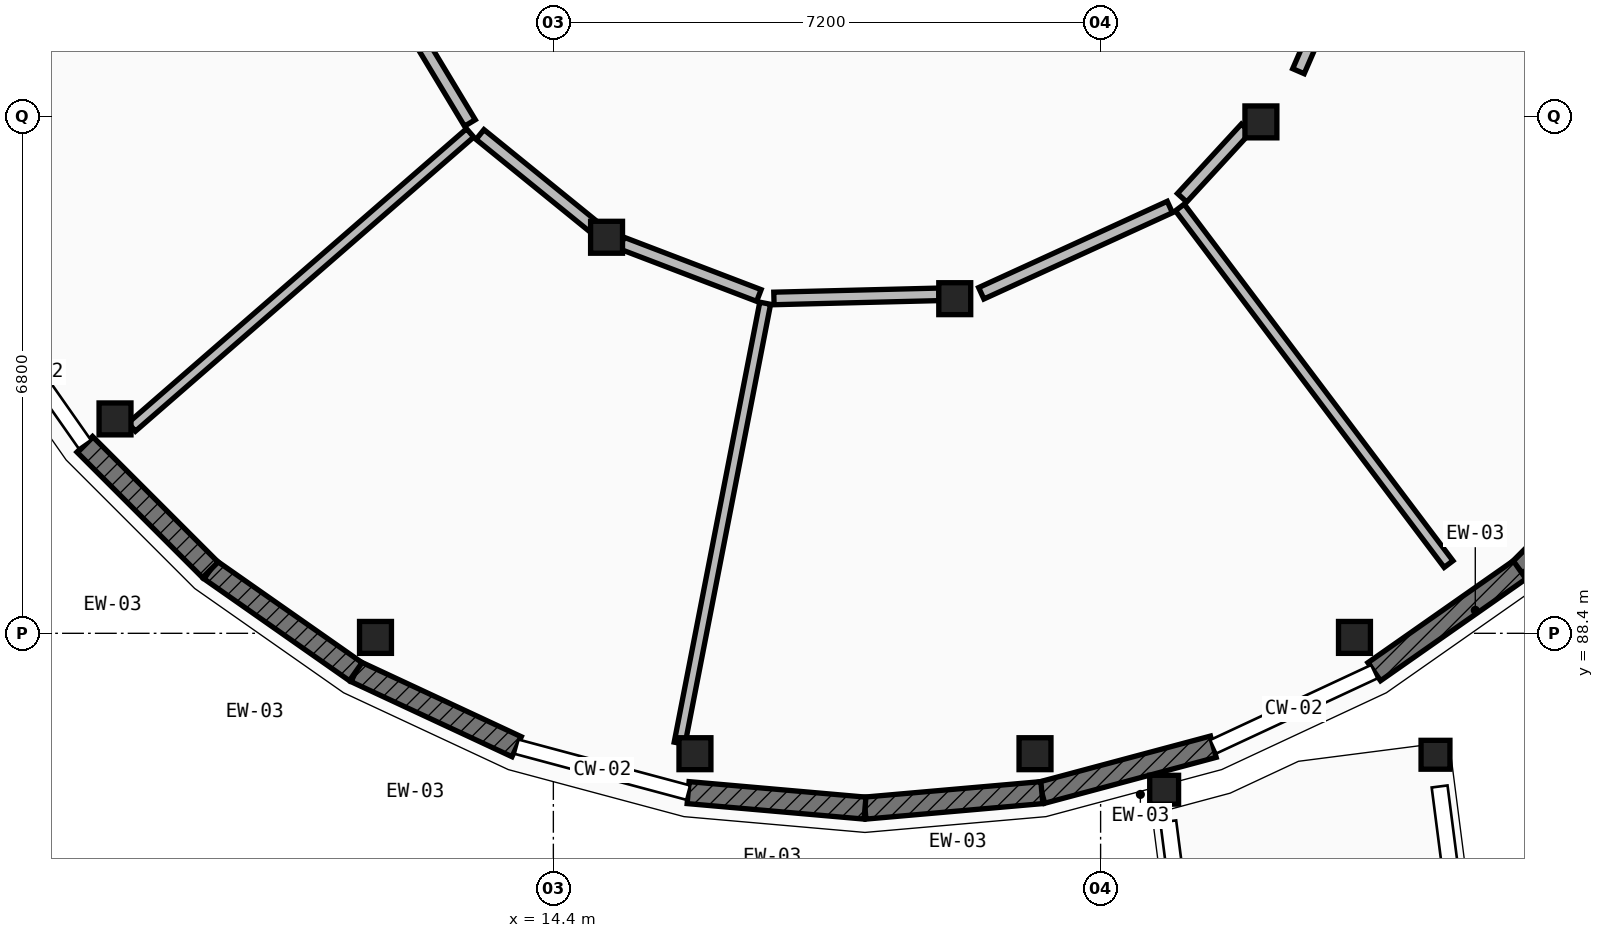
"""IFC4 building model, lengths in metres.
Left out: names, types, materials, properties, quantities, classifications, styles, units other than length and angle.
Written with IfcOpenShell. Run it as: python <this file> out.ifc"""

import sys

from ifc_helpers import new_model, si_unit, direction, frame, frame_2d, origin, origin_2d, place, context, subcontext, project, spatial, rectangle, circle, extrude, element, fill, save


model = new_model("IFC4")
c1 = context("Model", 3, precision=1e-05, world=origin(), true_north=direction((0.0, 1.0)))
c2 = subcontext(c1, "Body", "Model", "MODEL_VIEW")
j1 = project(units=[si_unit("LENGTHUNIT", "METRE"), si_unit("PLANEANGLEUNIT", "RADIAN")], contexts=[c1])
p1 = place(None, origin())
s1 = spatial("IfcSite", under=j1, at=p1, CompositionType="ELEMENT")
p2 = place(p1, origin())
s2 = spatial("IfcBuilding", under=s1, at=p2, CompositionType="ELEMENT")
p3 = place(p2, frame((0.0, 0.0, 4.55)))
s3 = spatial("IfcBuildingStorey", under=s2, at=p3, CompositionType="ELEMENT", Elevation=4.55)
for number, where, z_axis, x_axis in (
    (1, (8.633, 91.221, 0.0), (0.0, 0.0, 1.0), (1.0, 0.0, 0.0)),
    (2, (12.06, 88.346, 0.0), (0.0, 0.0, 1.0), (1.0, 0.0, 0.0)),
    (3, (16.263, 86.816, 0.0), (0.0, 0.0, 1.0), (1.0, 0.0, 0.0)),
    (4, (20.737, 86.816, 0.0), (0.0, 0.0, 1.0), (1.0, 0.0, 0.0)),
    (5, (24.94, 88.346, 0.0), (0.0, 0.0, 1.0), (1.0, 0.0, 0.0)),
    (6, (15.1, 93.611, 0.0), (0.0, 0.0, 1.0), (1.0, 0.0, 0.0)),
    (7, (19.681, 92.803, 0.0), (0.0, 0.0, 1.0), (1.0, 0.0, 0.0)),
    (8, (23.709, 95.129, 0.0), (0.0, 0.0, 1.0), (1.0, 0.0, 0.0)),
):
    element("IfcColumn", number, at=place(p3, frame(where, z_axis=z_axis, x_axis=x_axis)), inside=s3, PredefinedType="COLUMN", context=c2, shape_type="SweptSolid", body=[
        extrude(rectangle(XDim=0.42, YDim=0.42, at=origin_2d()), origin(), (0.0, 0.0, 1.0), 4.2),
    ])
for number, where, z_axis, x_axis in (
    (9, (22.436, 86.342, 0.0), (0.0, 0.0, 1.0), (1.0, 0.0, 0.0)),
    (10, (26.006, 86.802, 0.0), (0.0, 0.0, 1.0), (1.0, 0.0, 0.0)),
):
    element("IfcColumn", number, at=place(p3, frame(where, z_axis=z_axis, x_axis=x_axis)), inside=s3, PredefinedType="PILASTER", context=c2, shape_type="SweptSolid", body=[
        extrude(circle(Radius=0.19, at=origin_2d()), origin(), (0.0, 0.0, 1.0), 4.2),
    ])
p4 = place(p3, frame((28.765, 90.887, 0.0), z_axis=(0.0, 0.0, 1.0), x_axis=(-0.707106781187, -0.707106781187, 0.0)))
e11 = element("IfcWall", 11, at=p4, inside=s3, PredefinedType="ELEMENTEDWALL", context=c2, shape_type="SweptSolid", body=[
    extrude(rectangle(XDim=2.336, YDim=0.29, at=frame_2d((1.168, 0.0))), origin(), (0.0, 0.0, 1.0), 3.309),
])
p5 = place(p4, frame((0.568, 0.0, 0.85)))
e12 = element("IfcOpeningElement", 12, at=p5, cuts=e11, PredefinedType="OPENING", context=c2, shape_type="SweptSolid", body=[
    extrude(rectangle(XDim=1.2, YDim=2.25, at=frame_2d((0.6, 1.125))), frame((0.0, 0.155, 0.0), z_axis=(0.0, -1.0, 0.0), x_axis=(1.0, 0.0, 0.0)), (0.0, 0.0, 1.0), 0.31),
])
p6 = place(p3, frame((27.113, 89.235, 0.0), z_axis=(0.0, 0.0, 1.0), x_axis=(-0.819045278347, -0.573728883722, 0.0)))
e13 = element("IfcWall", 13, at=p6, inside=s3, PredefinedType="ELEMENTEDWALL", context=c2, shape_type="SweptSolid", body=[
    extrude(rectangle(XDim=2.336, YDim=0.29, at=frame_2d((1.168, 0.0))), origin(), (0.0, 0.0, 1.0), 3.309),
])
p7 = place(p6, frame((0.558, 0.0, 0.85)))
e14 = element("IfcOpeningElement", 14, at=p7, cuts=e13, PredefinedType="OPENING", context=c2, shape_type="SweptSolid", body=[
    extrude(rectangle(XDim=1.22, YDim=1.5, at=frame_2d((0.61, 0.75))), frame((0.0, 0.155, 0.0), z_axis=(0.0, -1.0, 0.0), x_axis=(1.0, 0.0, 0.0)), (0.0, 0.0, 1.0), 0.31),
])
p8 = place(p3, frame((23.083, 86.908, 0.0), z_axis=(0.0, 0.0, 1.0), x_axis=(-0.965981166673, -0.258612423585, 0.0)))
e15 = element("IfcWall", 15, at=p8, inside=s3, PredefinedType="ELEMENTEDWALL", context=c2, shape_type="SweptSolid", body=[
    extrude(rectangle(XDim=2.335, YDim=0.29, at=frame_2d((1.168, 0.0))), origin(), (0.0, 0.0, 1.0), 3.309),
])
p9 = place(p3, frame((20.827, 86.304, 0.0), z_axis=(0.0, 0.0, 1.0), x_axis=(-0.996184295282, -0.087274565792, 0.0)))
e16 = element("IfcWall", 16, at=p9, inside=s3, PredefinedType="ELEMENTEDWALL", context=c2, shape_type="SweptSolid", body=[
    extrude(rectangle(XDim=2.336, YDim=0.29, at=frame_2d((1.168, 0.0))), origin(), (0.0, 0.0, 1.0), 3.309),
])
p10 = place(p9, frame((0.558, 0.0, 0.85)))
e17 = element("IfcOpeningElement", 17, at=p10, cuts=e16, PredefinedType="OPENING", context=c2, shape_type="SweptSolid", body=[
    extrude(rectangle(XDim=1.22, YDim=1.8, at=frame_2d((0.61, 0.9))), frame((0.0, 0.155, 0.0), z_axis=(0.0, -1.0, 0.0), x_axis=(1.0, 0.0, 0.0)), (0.0, 0.0, 1.0), 0.31),
])
p11 = place(p3, frame((18.5, 86.1, 0.0), z_axis=(0.0, 0.0, 1.0), x_axis=(-0.996184295282, 0.087274565792, 0.0)))
e18 = element("IfcWall", 18, at=p11, inside=s3, PredefinedType="ELEMENTEDWALL", context=c2, shape_type="SweptSolid", body=[
    extrude(rectangle(XDim=2.336, YDim=0.29, at=frame_2d((1.168, 0.0))), origin(), (0.0, 0.0, 1.0), 3.309),
])
p12 = place(p11, frame((0.543, 0.0, 0.85)))
e19 = element("IfcOpeningElement", 19, at=p12, cuts=e18, PredefinedType="OPENING", context=c2, shape_type="SweptSolid", body=[
    extrude(rectangle(XDim=1.25, YDim=1.5, at=frame_2d((0.625, 0.75))), frame((0.0, 0.155, 0.0), z_axis=(0.0, -1.0, 0.0), x_axis=(1.0, 0.0, 0.0)), (0.0, 0.0, 1.0), 0.31),
])
p13 = place(p3, frame((13.917, 86.908, 0.0), z_axis=(0.0, 0.0, 1.0), x_axis=(-0.906321946979, 0.422587894318, 0.0)))
e20 = element("IfcWall", 20, at=p13, inside=s3, PredefinedType="ELEMENTEDWALL", context=c2, shape_type="SweptSolid", body=[
    extrude(rectangle(XDim=2.336, YDim=0.29, at=frame_2d((1.168, 0.0))), origin(), (0.0, 0.0, 1.0), 3.309),
])
p14 = place(p13, frame((0.543, 0.0, 0.85)))
e21 = element("IfcOpeningElement", 21, at=p14, cuts=e20, PredefinedType="OPENING", context=c2, shape_type="SweptSolid", body=[
    extrude(rectangle(XDim=1.25, YDim=1.8, at=frame_2d((0.625, 0.9))), frame((0.0, 0.155, 0.0), z_axis=(0.0, -1.0, 0.0), x_axis=(1.0, 0.0, 0.0)), (0.0, 0.0, 1.0), 0.31),
])
p15 = place(p3, frame((11.8, 87.895, 0.0), z_axis=(0.0, 0.0, 1.0), x_axis=(-0.819045278347, 0.573728883722, 0.0)))
e22 = element("IfcWall", 22, at=p15, inside=s3, PredefinedType="ELEMENTEDWALL", context=c2, shape_type="SweptSolid", body=[
    extrude(rectangle(XDim=2.336, YDim=0.29, at=frame_2d((1.168, 0.0))), origin(), (0.0, 0.0, 1.0), 3.309),
])
p16 = place(p15, frame((0.543, 0.0, 0.85)))
e23 = element("IfcOpeningElement", 23, at=p16, cuts=e22, PredefinedType="OPENING", context=c2, shape_type="SweptSolid", body=[
    extrude(rectangle(XDim=1.25, YDim=2.1, at=frame_2d((0.625, 1.05))), frame((0.0, 0.155, 0.0), z_axis=(0.0, -1.0, 0.0), x_axis=(1.0, 0.0, 0.0)), (0.0, 0.0, 1.0), 0.31),
])
p17 = place(p3, frame((9.887, 89.235, 0.0), z_axis=(0.0, 0.0, 1.0), x_axis=(-0.707106781187, 0.707106781187, 0.0)))
e24 = element("IfcWall", 24, at=p17, inside=s3, PredefinedType="ELEMENTEDWALL", context=c2, shape_type="SweptSolid", body=[
    extrude(rectangle(XDim=2.336, YDim=0.29, at=frame_2d((1.168, 0.0))), origin(), (0.0, 0.0, 1.0), 3.309),
])
p18 = place(p17, frame((0.528, 0.0, 0.85)))
e25 = element("IfcOpeningElement", 25, at=p18, cuts=e24, PredefinedType="OPENING", context=c2, shape_type="SweptSolid", body=[
    extrude(rectangle(XDim=1.28, YDim=1.65, at=frame_2d((0.64, 0.825))), frame((0.0, 0.155, 0.0), z_axis=(0.0, -1.0, 0.0), x_axis=(1.0, 0.0, 0.0)), (0.0, 0.0, 1.0), 0.31),
])
p19 = place(p3, frame((13.305, 94.984, 0.0), z_axis=(0.0, 0.0, 1.0), x_axis=(-0.754647404393, -0.656130547256, 0.0)))
e26 = element("IfcWall", 26, at=p19, inside=s3, PredefinedType="PARTITIONING", context=c2, shape_type="SweptSolid", body=[
    extrude(rectangle(XDim=5.898, YDim=0.145, at=frame_2d((2.949, 0.0))), origin(), (0.0, 0.0, 1.0), 3.284),
])
p20 = place(p3, frame((17.187, 92.743, 0.0), z_axis=(0.0, 0.0, 1.0), x_axis=(-0.190930602481, -0.981603537604, 0.0)))
e27 = element("IfcWall", 27, at=p20, inside=s3, PredefinedType="PARTITIONING", context=c2, shape_type="SweptSolid", body=[
    extrude(rectangle(XDim=5.897, YDim=0.145, at=frame_2d((2.949, 0.0))), origin(), (0.0, 0.0, 1.0), 3.284),
])
p21 = place(p3, frame((22.642, 94.003, 0.0), z_axis=(0.0, 0.0, 1.0), x_axis=(0.601846782462, -0.798611576701, 0.0)))
e28 = element("IfcWall", 28, at=p21, inside=s3, PredefinedType="PARTITIONING", context=c2, shape_type="SweptSolid", body=[
    extrude(rectangle(XDim=5.875, YDim=0.145, at=frame_2d((2.938, 0.0))), origin(), (0.0, 0.0, 1.0), 3.284),
])
p22 = place(p3, frame((12.45, 96.53, 0.0), z_axis=(0.0, 0.0, 1.0), x_axis=(0.515842762515, -0.856683281243, 0.0)))
e29 = element("IfcWall", 29, at=p22, inside=s3, PredefinedType="PARTITIONING", context=c2, shape_type="SweptSolid", body=[
    extrude(rectangle(XDim=1.652, YDim=0.165, at=frame_2d((0.826, 0.0))), origin(), (0.0, 0.0, 1.0), 3.284),
])
p23 = place(p22, frame((0.321, 0.0, 0.0)))
e30 = element("IfcOpeningElement", 30, at=p23, cuts=e29, PredefinedType="OPENING", context=c2, shape_type="SweptSolid", body=[
    extrude(rectangle(XDim=1.01, YDim=2.15, at=frame_2d((0.505, 1.075))), frame((0.0, 0.093, 0.0), z_axis=(0.0, -1.0, 0.0), x_axis=(1.0, 0.0, 0.0)), (0.0, 0.0, 1.0), 0.185),
])
p24 = place(p3, frame((13.435, 94.963, 0.0), z_axis=(0.0, 0.0, 1.0), x_axis=(0.776454505021, -0.63017331079, 0.0)))
e31 = element("IfcWall", 31, at=p24, inside=s3, PredefinedType="PARTITIONING", context=c2, shape_type="SweptSolid", body=[
    extrude(rectangle(XDim=1.929, YDim=0.165, at=frame_2d((0.965, 0.0))), origin(), (0.0, 0.0, 1.0), 3.284),
])
p25 = place(p24, frame((0.45, 0.0, 0.0)))
e32 = element("IfcOpeningElement", 32, at=p25, cuts=e31, PredefinedType="OPENING", context=c2, shape_type="SweptSolid", body=[
    extrude(rectangle(XDim=1.03, YDim=2.18, at=frame_2d((0.515, 1.09))), frame((0.0, 0.093, 0.0), z_axis=(0.0, -1.0, 0.0), x_axis=(1.0, 0.0, 0.0)), (0.0, 0.0, 1.0), 0.185),
])
p26 = place(p3, frame((15.301, 93.534, 0.0), z_axis=(0.0, 0.0, 1.0), x_axis=(0.934122555003, -0.356952450944, 0.0)))
e33 = element("IfcWall", 33, at=p26, inside=s3, PredefinedType="PARTITIONING", context=c2, shape_type="SweptSolid", body=[
    extrude(rectangle(XDim=1.93, YDim=0.165, at=frame_2d((0.965, 0.0))), origin(), (0.0, 0.0, 1.0), 3.284),
])
p27 = place(p3, frame((17.302, 92.806, 0.0), z_axis=(0.0, 0.0, 1.0), x_axis=(0.999688838374, 0.024944466912, 0.0)))
e34 = element("IfcWall", 34, at=p27, inside=s3, PredefinedType="PARTITIONING", context=c2, shape_type="SweptSolid", body=[
    extrude(rectangle(XDim=2.173, YDim=0.165, at=frame_2d((1.086, 0.0))), origin(), (0.0, 0.0, 1.0), 3.284),
])
p28 = place(p27, frame((0.552, 0.0, 0.0)))
e35 = element("IfcOpeningElement", 35, at=p28, cuts=e34, PredefinedType="OPENING", context=c2, shape_type="SweptSolid", body=[
    extrude(rectangle(XDim=1.07, YDim=2.2, at=frame_2d((0.535, 1.1))), frame((0.0, 0.093, 0.0), z_axis=(0.0, -1.0, 0.0), x_axis=(1.0, 0.0, 0.0)), (0.0, 0.0, 1.0), 0.185),
])
p29 = place(p3, frame((20.03, 92.874, 0.0), z_axis=(0.0, 0.0, 1.0), x_axis=(0.909355526696, 0.416019862587, 0.0)))
e36 = element("IfcWall", 36, at=p29, inside=s3, PredefinedType="PARTITIONING", context=c2, shape_type="SweptSolid", body=[
    extrude(rectangle(XDim=2.728, YDim=0.165, at=frame_2d((1.364, 0.0))), origin(), (0.0, 0.0, 1.0), 3.284),
])
p30 = place(p3, frame((22.672, 94.131, 0.0), z_axis=(0.0, 0.0, 1.0), x_axis=(0.677069322474, 0.735919243236, 0.0)))
e37 = element("IfcWall", 37, at=p30, inside=s3, PredefinedType="PARTITIONING", context=c2, shape_type="SweptSolid", body=[
    extrude(rectangle(XDim=1.24, YDim=0.165, at=frame_2d((0.62, 0.0))), origin(), (0.0, 0.0, 1.0), 3.284),
])
p31 = place(p3, frame((24.203, 95.796, 0.0), z_axis=(0.0, 0.0, 1.0), x_axis=(0.397419678039, 0.917636964985, 0.0)))
e38 = element("IfcWall", 38, at=p31, inside=s3, PredefinedType="PARTITIONING", context=c2, shape_type="SweptSolid", body=[
    extrude(rectangle(XDim=2.262, YDim=0.165, at=frame_2d((1.131, 0.0))), origin(), (0.0, 0.0, 1.0), 3.284),
])
p32 = place(p31, frame((0.586, 0.0, 0.0)))
e39 = element("IfcOpeningElement", 39, at=p32, cuts=e38, PredefinedType="OPENING", context=c2, shape_type="SweptSolid", body=[
    extrude(rectangle(XDim=1.09, YDim=2.22, at=frame_2d((0.545, 1.11))), frame((0.0, 0.093, 0.0), z_axis=(0.0, -1.0, 0.0), x_axis=(1.0, 0.0, 0.0)), (0.0, 0.0, 1.0), 0.185),
])
p33 = place(p7, origin())
e40 = element("IfcWindow", 40, at=p33, inside=s3, PartitioningType="SINGLE_PANEL", PredefinedType="WINDOW", context=c2, shape_type="SweptSolid", body=[
    extrude(rectangle(XDim=1.22, YDim=1.5, at=frame_2d((0.61, 0.75))), frame((0.0, 0.03, 0.0), z_axis=(0.0, -1.0, 0.0), x_axis=(1.0, 0.0, 0.0)), (0.0, 0.0, 1.0), 0.06),
])
fill(e14, e40)
p34 = place(p10, origin())
e41 = element("IfcWindow", 41, at=p34, inside=s3, PartitioningType="SINGLE_PANEL", PredefinedType="WINDOW", context=c2, shape_type="SweptSolid", body=[
    extrude(rectangle(XDim=1.22, YDim=1.8, at=frame_2d((0.61, 0.9))), frame((0.0, 0.03, 0.0), z_axis=(0.0, -1.0, 0.0), x_axis=(1.0, 0.0, 0.0)), (0.0, 0.0, 1.0), 0.06),
])
fill(e17, e41)
p35 = place(p12, origin())
e42 = element("IfcWindow", 42, at=p35, inside=s3, PartitioningType="SINGLE_PANEL", PredefinedType="WINDOW", context=c2, shape_type="SweptSolid", body=[
    extrude(rectangle(XDim=1.25, YDim=1.5, at=frame_2d((0.625, 0.75))), frame((0.0, 0.03, 0.0), z_axis=(0.0, -1.0, 0.0), x_axis=(1.0, 0.0, 0.0)), (0.0, 0.0, 1.0), 0.06),
])
fill(e19, e42)
p36 = place(p14, origin())
e43 = element("IfcWindow", 43, at=p36, inside=s3, PartitioningType="SINGLE_PANEL", PredefinedType="WINDOW", context=c2, shape_type="SweptSolid", body=[
    extrude(rectangle(XDim=1.25, YDim=1.8, at=frame_2d((0.625, 0.9))), frame((0.0, 0.03, 0.0), z_axis=(0.0, -1.0, 0.0), x_axis=(1.0, 0.0, 0.0)), (0.0, 0.0, 1.0), 0.06),
])
fill(e21, e43)
p37 = place(p16, origin())
e44 = element("IfcWindow", 44, at=p37, inside=s3, PartitioningType="SINGLE_PANEL", PredefinedType="WINDOW", context=c2, shape_type="SweptSolid", body=[
    extrude(rectangle(XDim=1.25, YDim=2.1, at=frame_2d((0.625, 1.05))), frame((0.0, 0.03, 0.0), z_axis=(0.0, -1.0, 0.0), x_axis=(1.0, 0.0, 0.0)), (0.0, 0.0, 1.0), 0.06),
])
fill(e23, e44)
p38 = place(p18, origin())
e45 = element("IfcWindow", 45, at=p38, inside=s3, PartitioningType="SINGLE_PANEL", PredefinedType="WINDOW", context=c2, shape_type="SweptSolid", body=[
    extrude(rectangle(XDim=1.28, YDim=1.65, at=frame_2d((0.64, 0.825))), frame((0.0, 0.03, 0.0), z_axis=(0.0, -1.0, 0.0), x_axis=(1.0, 0.0, 0.0)), (0.0, 0.0, 1.0), 0.06),
])
fill(e25, e45)
p39 = place(p23, origin())
e46 = element("IfcDoor", 46, at=p39, inside=s3, OperationType="SINGLE_SWING_LEFT", PredefinedType="DOOR", context=c2, shape_type="SweptSolid", body=[
    extrude(rectangle(XDim=1.01, YDim=2.15, at=frame_2d((0.505, 1.075))), frame((0.0, 0.025, 0.0), z_axis=(0.0, -1.0, 0.0), x_axis=(1.0, 0.0, 0.0)), (0.0, 0.0, 1.0), 0.05),
])
fill(e30, e46)
p40 = place(p25, origin())
e47 = element("IfcDoor", 47, at=p40, inside=s3, OperationType="SINGLE_SWING_RIGHT", PredefinedType="DOOR", context=c2, shape_type="SweptSolid", body=[
    extrude(rectangle(XDim=1.03, YDim=2.18, at=frame_2d((0.515, 1.09))), frame((0.0, 0.025, 0.0), z_axis=(0.0, -1.0, 0.0), x_axis=(1.0, 0.0, 0.0)), (0.0, 0.0, 1.0), 0.05),
])
fill(e32, e47)
p41 = place(p28, origin())
e48 = element("IfcDoor", 48, at=p41, inside=s3, OperationType="SINGLE_SWING_LEFT", PredefinedType="DOOR", context=c2, shape_type="SweptSolid", body=[
    extrude(rectangle(XDim=1.07, YDim=2.2, at=frame_2d((0.535, 1.1))), frame((0.0, 0.025, 0.0), z_axis=(0.0, -1.0, 0.0), x_axis=(1.0, 0.0, 0.0)), (0.0, 0.0, 1.0), 0.05),
])
fill(e35, e48)
save(model, sys.argv[1])
